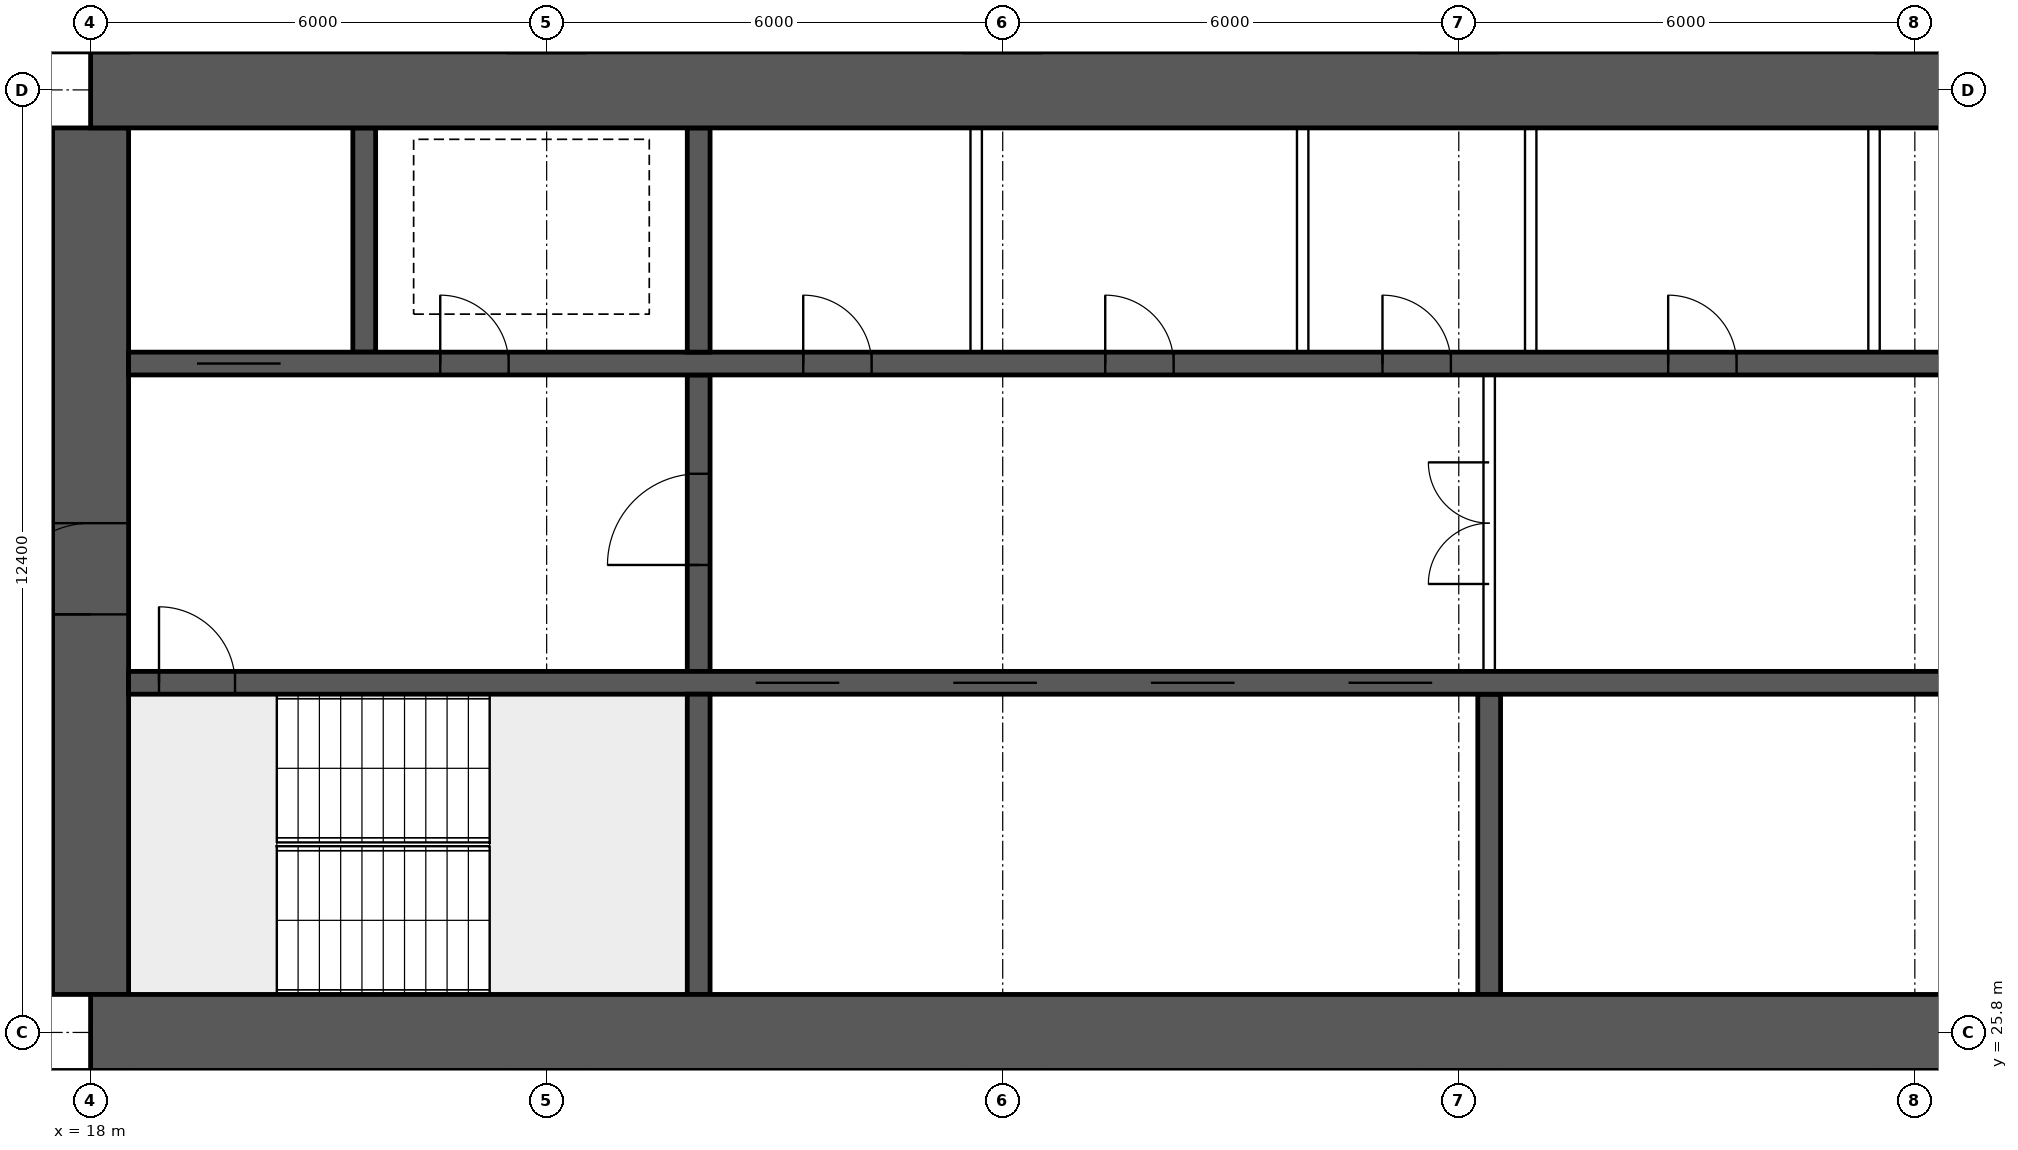
"""IFC4 building model, lengths in metres.
Left out: names, types, materials, properties, quantities, classifications, styles, units other than length and angle.
Written with IfcOpenShell. Run it as: python <this file> out.ifc"""

import sys

from ifc_helpers import new_model, si_unit, direction, frame, frame_2d, origin, place, context, subcontext, project, spatial, rectangle, extrude, element, fill, save


model = new_model("IFC4")
c1 = context("Model", 3, precision=1e-05, world=origin(), true_north=direction((0.0, 1.0)))
c2 = subcontext(c1, "Body", "Model", "MODEL_VIEW")
j1 = project(units=[si_unit("LENGTHUNIT", "METRE"), si_unit("PLANEANGLEUNIT", "RADIAN")], contexts=[c1])
p1 = place(None, origin())
s1 = spatial("IfcSite", under=j1, at=p1, CompositionType="ELEMENT")
p2 = place(p1, origin())
s2 = spatial("IfcBuilding", under=s1, at=p2, CompositionType="ELEMENT")
p3 = place(p2, frame((0.0, 0.0, 42.7)))
s3 = spatial("IfcBuildingStorey", under=s2, at=p3, CompositionType="ELEMENT", Elevation=42.7)
for number, where, z_axis, x_axis in (
    (1, (18.0, 25.8, 0.0), (0.0, 0.0, 1.0), (1.0, 0.0, 0.0)),
    (2, (18.0, 38.2, 0.0), (0.0, 0.0, 1.0), (1.0, 0.0, 0.0)),
):
    element("IfcWall", number, at=place(p3, frame(where, z_axis=z_axis, x_axis=x_axis)), inside=s3, PredefinedType="SHEAR", context=c2, shape_type="SweptSolid", body=[
        extrude(rectangle(XDim=48.0, YDim=1.0, at=frame_2d((24.0, 0.0))), origin(), (0.0, 0.0, 1.0), 3.75),
    ])
p4 = place(p3, frame((18.0, 26.3, 0.0), z_axis=(0.0, 0.0, 1.0), x_axis=(0.0, 1.0, 0.0)))
e3 = element("IfcWall", 3, at=p4, inside=s3, PredefinedType="SHEAR", context=c2, shape_type="SweptSolid", body=[
    extrude(rectangle(XDim=11.4, YDim=1.0, at=frame_2d((5.7, 0.0))), origin(), (0.0, 0.0, 1.0), 3.75),
])
p5 = place(p4, frame((5.0, 0.0, 0.0)))
e4 = element("IfcOpeningElement", 4, at=p5, cuts=e3, PredefinedType="OPENING", context=c2, shape_type="SweptSolid", body=[
    extrude(rectangle(XDim=1.2, YDim=2.1, at=frame_2d((0.6, 1.05))), frame((0.0, 0.51, 0.0), z_axis=(0.0, -1.0, 0.0), x_axis=(1.0, 0.0, 0.0)), (0.0, 0.0, 1.0), 1.02),
])
p6 = place(p3, frame((18.5, 30.4, 0.0), z_axis=(0.0, 0.0, 1.0), x_axis=(1.0, 0.0, 0.0)))
e5 = element("IfcWall", 5, at=p6, inside=s3, PredefinedType="SHEAR", context=c2, shape_type="SweptSolid", body=[
    extrude(rectangle(XDim=47.0, YDim=0.3, at=frame_2d((23.5, 0.0))), origin(), (0.0, 0.0, 1.0), 3.75),
])
p7 = place(p6, frame((0.4, 0.0, 0.0)))
e6 = element("IfcOpeningElement", 6, at=p7, cuts=e5, PredefinedType="OPENING", context=c2, shape_type="SweptSolid", body=[
    extrude(rectangle(XDim=1.0, YDim=2.1, at=frame_2d((0.5, 1.05))), frame((0.0, 0.16, 0.0), z_axis=(0.0, -1.0, 0.0), x_axis=(1.0, 0.0, 0.0)), (0.0, 0.0, 1.0), 0.32),
])
p8 = place(p6, frame((45.6, 0.0, 0.0)))
e7 = element("IfcOpeningElement", 7, at=p8, cuts=e5, PredefinedType="OPENING", context=c2, shape_type="SweptSolid", body=[
    extrude(rectangle(XDim=1.0, YDim=2.1, at=frame_2d((0.5, 1.05))), frame((0.0, 0.16, 0.0), z_axis=(0.0, -1.0, 0.0), x_axis=(1.0, 0.0, 0.0)), (0.0, 0.0, 1.0), 0.32),
])
p9 = place(p6, frame((8.25, 0.0, 0.0)))
e8 = element("IfcOpeningElement", 8, at=p9, cuts=e5, PredefinedType="OPENING", context=c2, shape_type="SweptSolid", body=[
    extrude(rectangle(XDim=1.1, YDim=2.1, at=frame_2d((0.55, 1.05))), frame((0.0, 0.16, 0.0), z_axis=(0.0, -1.0, 0.0), x_axis=(1.0, 0.0, 0.0)), (0.0, 0.0, 1.0), 0.32),
])
p10 = place(p6, frame((10.85, 0.0, 0.0)))
e9 = element("IfcOpeningElement", 9, at=p10, cuts=e5, PredefinedType="OPENING", context=c2, shape_type="SweptSolid", body=[
    extrude(rectangle(XDim=1.1, YDim=2.1, at=frame_2d((0.55, 1.05))), frame((0.0, 0.16, 0.0), z_axis=(0.0, -1.0, 0.0), x_axis=(1.0, 0.0, 0.0)), (0.0, 0.0, 1.0), 0.32),
])
p11 = place(p6, frame((13.45, 0.0, 0.0)))
e10 = element("IfcOpeningElement", 10, at=p11, cuts=e5, PredefinedType="OPENING", context=c2, shape_type="SweptSolid", body=[
    extrude(rectangle(XDim=1.1, YDim=2.1, at=frame_2d((0.55, 1.05))), frame((0.0, 0.16, 0.0), z_axis=(0.0, -1.0, 0.0), x_axis=(1.0, 0.0, 0.0)), (0.0, 0.0, 1.0), 0.32),
])
p12 = place(p6, frame((16.05, 0.0, 0.0)))
e11 = element("IfcOpeningElement", 11, at=p12, cuts=e5, PredefinedType="OPENING", context=c2, shape_type="SweptSolid", body=[
    extrude(rectangle(XDim=1.1, YDim=2.1, at=frame_2d((0.55, 1.05))), frame((0.0, 0.16, 0.0), z_axis=(0.0, -1.0, 0.0), x_axis=(1.0, 0.0, 0.0)), (0.0, 0.0, 1.0), 0.32),
])
p13 = place(p6, frame((30.117, 0.0, 0.0)))
e12 = element("IfcOpeningElement", 12, at=p13, cuts=e5, PredefinedType="OPENING", context=c2, shape_type="SweptSolid", body=[
    extrude(rectangle(XDim=1.1, YDim=2.1, at=frame_2d((0.55, 1.05))), frame((0.0, 0.16, 0.0), z_axis=(0.0, -1.0, 0.0), x_axis=(1.0, 0.0, 0.0)), (0.0, 0.0, 1.0), 0.32),
])
p14 = place(p6, frame((33.65, 0.0, 0.0)))
e13 = element("IfcOpeningElement", 13, at=p14, cuts=e5, PredefinedType="OPENING", context=c2, shape_type="SweptSolid", body=[
    extrude(rectangle(XDim=1.1, YDim=2.1, at=frame_2d((0.55, 1.05))), frame((0.0, 0.16, 0.0), z_axis=(0.0, -1.0, 0.0), x_axis=(1.0, 0.0, 0.0)), (0.0, 0.0, 1.0), 0.32),
])
p15 = place(p6, frame((37.183, 0.0, 0.0)))
e14 = element("IfcOpeningElement", 14, at=p15, cuts=e5, PredefinedType="OPENING", context=c2, shape_type="SweptSolid", body=[
    extrude(rectangle(XDim=1.1, YDim=2.1, at=frame_2d((0.55, 1.05))), frame((0.0, 0.16, 0.0), z_axis=(0.0, -1.0, 0.0), x_axis=(1.0, 0.0, 0.0)), (0.0, 0.0, 1.0), 0.32),
])
p16 = place(p3, frame((18.5, 34.6, 0.0), z_axis=(0.0, 0.0, 1.0), x_axis=(1.0, 0.0, 0.0)))
e15 = element("IfcWall", 15, at=p16, inside=s3, PredefinedType="SHEAR", context=c2, shape_type="SweptSolid", body=[
    extrude(rectangle(XDim=47.0, YDim=0.3, at=frame_2d((23.5, 0.0))), origin(), (0.0, 0.0, 1.0), 3.75),
])
p17 = place(p16, frame((0.9, 0.0, 0.0)))
e16 = element("IfcOpeningElement", 16, at=p17, cuts=e15, PredefinedType="OPENING", context=c2, shape_type="SweptSolid", body=[
    extrude(rectangle(XDim=1.1, YDim=2.1, at=frame_2d((0.55, 1.05))), frame((0.0, 0.16, 0.0), z_axis=(0.0, -1.0, 0.0), x_axis=(1.0, 0.0, 0.0)), (0.0, 0.0, 1.0), 0.32),
])
p18 = place(p16, frame((45.0, 0.0, 0.0)))
e17 = element("IfcOpeningElement", 17, at=p18, cuts=e15, PredefinedType="OPENING", context=c2, shape_type="SweptSolid", body=[
    extrude(rectangle(XDim=1.1, YDim=2.1, at=frame_2d((0.55, 1.05))), frame((0.0, 0.16, 0.0), z_axis=(0.0, -1.0, 0.0), x_axis=(1.0, 0.0, 0.0)), (0.0, 0.0, 1.0), 0.32),
])
p19 = place(p16, frame((4.1, 0.0, 0.0)))
e18 = element("IfcOpeningElement", 18, at=p19, cuts=e15, PredefinedType="OPENING", context=c2, shape_type="SweptSolid", body=[
    extrude(rectangle(XDim=0.9, YDim=2.1, at=frame_2d((0.45, 1.05))), frame((0.0, 0.16, 0.0), z_axis=(0.0, -1.0, 0.0), x_axis=(1.0, 0.0, 0.0)), (0.0, 0.0, 1.0), 0.32),
])
p20 = place(p16, frame((42.0, 0.0, 0.0)))
e19 = element("IfcOpeningElement", 19, at=p20, cuts=e15, PredefinedType="OPENING", context=c2, shape_type="SweptSolid", body=[
    extrude(rectangle(XDim=0.9, YDim=2.1, at=frame_2d((0.45, 1.05))), frame((0.0, 0.16, 0.0), z_axis=(0.0, -1.0, 0.0), x_axis=(1.0, 0.0, 0.0)), (0.0, 0.0, 1.0), 0.32),
])
p21 = place(p16, frame((8.875, 0.0, 0.0)))
e20 = element("IfcOpeningElement", 20, at=p21, cuts=e15, PredefinedType="OPENING", context=c2, shape_type="SweptSolid", body=[
    extrude(rectangle(XDim=0.9, YDim=2.1, at=frame_2d((0.45, 1.05))), frame((0.0, 0.16, 0.0), z_axis=(0.0, -1.0, 0.0), x_axis=(1.0, 0.0, 0.0)), (0.0, 0.0, 1.0), 0.32),
])
p22 = place(p16, frame((12.849, 0.0, 0.0)))
e21 = element("IfcOpeningElement", 21, at=p22, cuts=e15, PredefinedType="OPENING", context=c2, shape_type="SweptSolid", body=[
    extrude(rectangle(XDim=0.9, YDim=2.1, at=frame_2d((0.45, 1.05))), frame((0.0, 0.16, 0.0), z_axis=(0.0, -1.0, 0.0), x_axis=(1.0, 0.0, 0.0)), (0.0, 0.0, 1.0), 0.32),
])
p23 = place(p16, frame((16.496, 0.0, 0.0)))
e22 = element("IfcOpeningElement", 22, at=p23, cuts=e15, PredefinedType="OPENING", context=c2, shape_type="SweptSolid", body=[
    extrude(rectangle(XDim=0.9, YDim=2.1, at=frame_2d((0.45, 1.05))), frame((0.0, 0.16, 0.0), z_axis=(0.0, -1.0, 0.0), x_axis=(1.0, 0.0, 0.0)), (0.0, 0.0, 1.0), 0.32),
])
p24 = place(p16, frame((20.255, 0.0, 0.0)))
e23 = element("IfcOpeningElement", 23, at=p24, cuts=e15, PredefinedType="OPENING", context=c2, shape_type="SweptSolid", body=[
    extrude(rectangle(XDim=0.9, YDim=2.1, at=frame_2d((0.45, 1.05))), frame((0.0, 0.16, 0.0), z_axis=(0.0, -1.0, 0.0), x_axis=(1.0, 0.0, 0.0)), (0.0, 0.0, 1.0), 0.32),
])
p25 = place(p16, frame((24.661, 0.0, 0.0)))
e24 = element("IfcOpeningElement", 24, at=p25, cuts=e15, PredefinedType="OPENING", context=c2, shape_type="SweptSolid", body=[
    extrude(rectangle(XDim=0.9, YDim=2.1, at=frame_2d((0.45, 1.05))), frame((0.0, 0.16, 0.0), z_axis=(0.0, -1.0, 0.0), x_axis=(1.0, 0.0, 0.0)), (0.0, 0.0, 1.0), 0.32),
])
p26 = place(p16, frame((27.458, 0.0, 0.0)))
e25 = element("IfcOpeningElement", 25, at=p26, cuts=e15, PredefinedType="OPENING", context=c2, shape_type="SweptSolid", body=[
    extrude(rectangle(XDim=0.9, YDim=2.1, at=frame_2d((0.45, 1.05))), frame((0.0, 0.16, 0.0), z_axis=(0.0, -1.0, 0.0), x_axis=(1.0, 0.0, 0.0)), (0.0, 0.0, 1.0), 0.32),
])
p27 = place(p16, frame((30.641, 0.0, 0.0)))
e26 = element("IfcOpeningElement", 26, at=p27, cuts=e15, PredefinedType="OPENING", context=c2, shape_type="SweptSolid", body=[
    extrude(rectangle(XDim=0.9, YDim=2.1, at=frame_2d((0.45, 1.05))), frame((0.0, 0.16, 0.0), z_axis=(0.0, -1.0, 0.0), x_axis=(1.0, 0.0, 0.0)), (0.0, 0.0, 1.0), 0.32),
])
p28 = place(p16, frame((34.592, 0.0, 0.0)))
e27 = element("IfcOpeningElement", 27, at=p28, cuts=e15, PredefinedType="OPENING", context=c2, shape_type="SweptSolid", body=[
    extrude(rectangle(XDim=0.9, YDim=2.1, at=frame_2d((0.45, 1.05))), frame((0.0, 0.16, 0.0), z_axis=(0.0, -1.0, 0.0), x_axis=(1.0, 0.0, 0.0)), (0.0, 0.0, 1.0), 0.32),
])
p29 = place(p16, frame((37.53, 0.0, 0.0)))
e28 = element("IfcOpeningElement", 28, at=p29, cuts=e15, PredefinedType="OPENING", context=c2, shape_type="SweptSolid", body=[
    extrude(rectangle(XDim=0.9, YDim=2.1, at=frame_2d((0.45, 1.05))), frame((0.0, 0.16, 0.0), z_axis=(0.0, -1.0, 0.0), x_axis=(1.0, 0.0, 0.0)), (0.0, 0.0, 1.0), 0.32),
])
p30 = place(p3, frame((26.0, 26.3, 0.0), z_axis=(0.0, 0.0, 1.0), x_axis=(0.0, 1.0, 0.0)))
e29 = element("IfcWall", 29, at=p30, inside=s3, PredefinedType="SHEAR", context=c2, shape_type="SweptSolid", body=[
    extrude(rectangle(XDim=3.95, YDim=0.3, at=frame_2d((1.975, 0.0))), origin(), (0.0, 0.0, 1.0), 3.75),
])
p31 = place(p3, frame((26.0, 30.55, 0.0), z_axis=(0.0, 0.0, 1.0), x_axis=(0.0, 1.0, 0.0)))
e30 = element("IfcWall", 30, at=p31, inside=s3, PredefinedType="SHEAR", context=c2, shape_type="SweptSolid", body=[
    extrude(rectangle(XDim=3.9, YDim=0.3, at=frame_2d((1.95, 0.0))), origin(), (0.0, 0.0, 1.0), 3.75),
])
p32 = place(p31, frame((1.4, 0.0, 0.0)))
e31 = element("IfcOpeningElement", 31, at=p32, cuts=e30, PredefinedType="OPENING", context=c2, shape_type="SweptSolid", body=[
    extrude(rectangle(XDim=1.2, YDim=2.1, at=frame_2d((0.6, 1.05))), frame((0.0, 0.16, 0.0), z_axis=(0.0, -1.0, 0.0), x_axis=(1.0, 0.0, 0.0)), (0.0, 0.0, 1.0), 0.32),
])
for number, where, z_axis, x_axis in (
    (32, (21.6, 34.75, 0.0), (0.0, 0.0, 1.0), (0.0, 1.0, 0.0)),
    (33, (26.0, 34.75, 0.0), (0.0, 0.0, 1.0), (0.0, 1.0, 0.0)),
):
    element("IfcWall", number, at=place(p3, frame(where, z_axis=z_axis, x_axis=x_axis)), inside=s3, PredefinedType="SHEAR", context=c2, shape_type="SweptSolid", body=[
        extrude(rectangle(XDim=2.95, YDim=0.3, at=frame_2d((1.475, 0.0))), origin(), (0.0, 0.0, 1.0), 3.75),
    ])
p33 = place(p3, frame((36.4, 26.3, 0.0), z_axis=(0.0, 0.0, 1.0), x_axis=(0.0, 1.0, 0.0)))
e34 = element("IfcWall", 34, at=p33, inside=s3, PredefinedType="SHEAR", context=c2, shape_type="SweptSolid", body=[
    extrude(rectangle(XDim=3.95, YDim=0.3, at=frame_2d((1.975, 0.0))), origin(), (0.0, 0.0, 1.0), 3.75),
])
p34 = place(p3, frame((36.4, 30.55, 0.0), z_axis=(0.0, 0.0, 1.0), x_axis=(0.0, 1.0, 0.0)))
e35 = element("IfcWall", 35, at=p34, inside=s3, PredefinedType="SOLIDWALL", context=c2, shape_type="SweptSolid", body=[
    extrude(rectangle(XDim=3.9, YDim=0.15, at=frame_2d((1.95, 0.0))), origin(), (0.0, 0.0, 1.0), 3.5),
])
p35 = place(p34, frame((1.15, 0.0, 0.0)))
e36 = element("IfcOpeningElement", 36, at=p35, cuts=e35, PredefinedType="OPENING", context=c2, shape_type="SweptSolid", body=[
    extrude(rectangle(XDim=1.6, YDim=2.1, at=frame_2d((0.8, 1.05))), frame((0.0, 0.085, 0.0), z_axis=(0.0, -1.0, 0.0), x_axis=(1.0, 0.0, 0.0)), (0.0, 0.0, 1.0), 0.17),
])
for number, where, z_axis, x_axis in (
    (37, (29.651, 34.75, 0.0), (0.0, 0.0, 1.0), (0.0, 1.0, 0.0)),
    (38, (33.946, 34.75, 0.0), (0.0, 0.0, 1.0), (0.0, 1.0, 0.0)),
    (39, (36.946, 34.75, 0.0), (0.0, 0.0, 1.0), (0.0, 1.0, 0.0)),
    (40, (41.463, 34.75, 0.0), (0.0, 0.0, 1.0), (0.0, 1.0, 0.0)),
):
    element("IfcWall", number, at=place(p3, frame(where, z_axis=z_axis, x_axis=x_axis)), inside=s3, PredefinedType="SOLIDWALL", context=c2, shape_type="SweptSolid", body=[
        extrude(rectangle(XDim=2.95, YDim=0.15, at=frame_2d((1.475, 0.0))), origin(), (0.0, 0.0, 1.0), 3.5),
    ])
for number, where, z_axis, x_axis in (
    (41, (26.815, 14.9, 0.0), (0.0, 0.0, 1.0), (0.0, 1.0, 0.0)),
    (42, (32.83, 14.9, 0.0), (0.0, 0.0, 1.0), (0.0, 1.0, 0.0)),
    (43, (39.31, 14.9, 0.0), (0.0, 0.0, 1.0), (0.0, 1.0, 0.0)),
):
    element("IfcWall", number, at=place(p3, frame(where, z_axis=z_axis, x_axis=x_axis)), inside=s3, PredefinedType="PARTITIONING", context=c2, shape_type="SweptSolid", body=[
        extrude(rectangle(XDim=10.4, YDim=0.15, at=frame_2d((5.2, 0.0))), origin(), (0.0, 0.0, 1.0), 3.5),
    ])
p36 = place(p35, origin())
e44 = element("IfcDoor", 44, at=p36, inside=s3, OperationType="DOUBLE_DOOR_SINGLE_SWING", PredefinedType="DOOR", context=c2, shape_type="SweptSolid", body=[
    extrude(rectangle(XDim=1.6, YDim=2.1, at=frame_2d((0.8, 1.05))), frame((0.0, 0.025, 0.0), z_axis=(0.0, -1.0, 0.0), x_axis=(1.0, 0.0, 0.0)), (0.0, 0.0, 1.0), 0.05),
])
fill(e36, e44)
p37 = place(p5, origin())
e45 = element("IfcDoor", 45, at=p37, inside=s3, OperationType="SINGLE_SWING_LEFT", PredefinedType="DOOR", context=c2, shape_type="SweptSolid", body=[
    extrude(rectangle(XDim=1.2, YDim=2.1, at=frame_2d((0.6, 1.05))), frame((0.0, 0.025, 0.0), z_axis=(0.0, -1.0, 0.0), x_axis=(1.0, 0.0, 0.0)), (0.0, 0.0, 1.0), 0.05),
])
fill(e4, e45)
p38 = place(p7, origin())
e46 = element("IfcDoor", 46, at=p38, inside=s3, OperationType="SINGLE_SWING_LEFT", PredefinedType="DOOR", context=c2, shape_type="SweptSolid", body=[
    extrude(rectangle(XDim=1.0, YDim=2.1, at=frame_2d((0.5, 1.05))), frame((0.0, 0.025, 0.0), z_axis=(0.0, -1.0, 0.0), x_axis=(1.0, 0.0, 0.0)), (0.0, 0.0, 1.0), 0.05),
])
fill(e6, e46)
p39 = place(p17, origin())
e47 = element("IfcDoor", 47, at=p39, inside=s3, OperationType="DOUBLE_DOOR_SLIDING", PredefinedType="DOOR", context=c2, shape_type="SweptSolid", body=[
    extrude(rectangle(XDim=1.1, YDim=2.1, at=frame_2d((0.55, 1.05))), frame((0.0, 0.025, 0.0), z_axis=(0.0, -1.0, 0.0), x_axis=(1.0, 0.0, 0.0)), (0.0, 0.0, 1.0), 0.05),
])
fill(e16, e47)
p40 = place(p19, origin())
e48 = element("IfcDoor", 48, at=p40, inside=s3, OperationType="SINGLE_SWING_LEFT", PredefinedType="DOOR", context=c2, shape_type="SweptSolid", body=[
    extrude(rectangle(XDim=0.9, YDim=2.1, at=frame_2d((0.45, 1.05))), frame((0.0, 0.025, 0.0), z_axis=(0.0, -1.0, 0.0), x_axis=(1.0, 0.0, 0.0)), (0.0, 0.0, 1.0), 0.05),
])
fill(e18, e48)
p41 = place(p32, origin())
e49 = element("IfcDoor", 49, at=p41, inside=s3, OperationType="SINGLE_SWING_LEFT", PredefinedType="DOOR", context=c2, shape_type="SweptSolid", body=[
    extrude(rectangle(XDim=1.2, YDim=2.1, at=frame_2d((0.6, 1.05))), frame((0.0, 0.025, 0.0), z_axis=(0.0, -1.0, 0.0), x_axis=(1.0, 0.0, 0.0)), (0.0, 0.0, 1.0), 0.05),
])
fill(e31, e49)
p42 = place(p21, origin())
e50 = element("IfcDoor", 50, at=p42, inside=s3, OperationType="SINGLE_SWING_LEFT", PredefinedType="DOOR", context=c2, shape_type="SweptSolid", body=[
    extrude(rectangle(XDim=0.9, YDim=2.1, at=frame_2d((0.45, 1.05))), frame((0.0, 0.025, 0.0), z_axis=(0.0, -1.0, 0.0), x_axis=(1.0, 0.0, 0.0)), (0.0, 0.0, 1.0), 0.05),
])
fill(e20, e50)
p43 = place(p22, origin())
e51 = element("IfcDoor", 51, at=p43, inside=s3, OperationType="SINGLE_SWING_LEFT", PredefinedType="DOOR", context=c2, shape_type="SweptSolid", body=[
    extrude(rectangle(XDim=0.9, YDim=2.1, at=frame_2d((0.45, 1.05))), frame((0.0, 0.025, 0.0), z_axis=(0.0, -1.0, 0.0), x_axis=(1.0, 0.0, 0.0)), (0.0, 0.0, 1.0), 0.05),
])
fill(e21, e51)
p44 = place(p23, origin())
e52 = element("IfcDoor", 52, at=p44, inside=s3, OperationType="SINGLE_SWING_LEFT", PredefinedType="DOOR", context=c2, shape_type="SweptSolid", body=[
    extrude(rectangle(XDim=0.9, YDim=2.1, at=frame_2d((0.45, 1.05))), frame((0.0, 0.025, 0.0), z_axis=(0.0, -1.0, 0.0), x_axis=(1.0, 0.0, 0.0)), (0.0, 0.0, 1.0), 0.05),
])
fill(e22, e52)
p45 = place(p24, origin())
e53 = element("IfcDoor", 53, at=p45, inside=s3, OperationType="SINGLE_SWING_LEFT", PredefinedType="DOOR", context=c2, shape_type="SweptSolid", body=[
    extrude(rectangle(XDim=0.9, YDim=2.1, at=frame_2d((0.45, 1.05))), frame((0.0, 0.025, 0.0), z_axis=(0.0, -1.0, 0.0), x_axis=(1.0, 0.0, 0.0)), (0.0, 0.0, 1.0), 0.05),
])
fill(e23, e53)
p46 = place(p9, origin())
e54 = element("IfcDoor", 54, at=p46, inside=s3, OperationType="DOUBLE_DOOR_SLIDING", PredefinedType="DOOR", context=c2, shape_type="SweptSolid", body=[
    extrude(rectangle(XDim=1.1, YDim=2.1, at=frame_2d((0.55, 1.05))), frame((0.0, 0.025, 0.0), z_axis=(0.0, -1.0, 0.0), x_axis=(1.0, 0.0, 0.0)), (0.0, 0.0, 1.0), 0.05),
])
fill(e8, e54)
p47 = place(p10, origin())
e55 = element("IfcDoor", 55, at=p47, inside=s3, OperationType="DOUBLE_DOOR_SLIDING", PredefinedType="DOOR", context=c2, shape_type="SweptSolid", body=[
    extrude(rectangle(XDim=1.1, YDim=2.1, at=frame_2d((0.55, 1.05))), frame((0.0, 0.025, 0.0), z_axis=(0.0, -1.0, 0.0), x_axis=(1.0, 0.0, 0.0)), (0.0, 0.0, 1.0), 0.05),
])
fill(e9, e55)
p48 = place(p11, origin())
e56 = element("IfcDoor", 56, at=p48, inside=s3, OperationType="DOUBLE_DOOR_SLIDING", PredefinedType="DOOR", context=c2, shape_type="SweptSolid", body=[
    extrude(rectangle(XDim=1.1, YDim=2.1, at=frame_2d((0.55, 1.05))), frame((0.0, 0.025, 0.0), z_axis=(0.0, -1.0, 0.0), x_axis=(1.0, 0.0, 0.0)), (0.0, 0.0, 1.0), 0.05),
])
fill(e10, e56)
p49 = place(p12, origin())
e57 = element("IfcDoor", 57, at=p49, inside=s3, OperationType="DOUBLE_DOOR_SLIDING", PredefinedType="DOOR", context=c2, shape_type="SweptSolid", body=[
    extrude(rectangle(XDim=1.1, YDim=2.1, at=frame_2d((0.55, 1.05))), frame((0.0, 0.025, 0.0), z_axis=(0.0, -1.0, 0.0), x_axis=(1.0, 0.0, 0.0)), (0.0, 0.0, 1.0), 0.05),
])
fill(e11, e57)
save(model, sys.argv[1])
